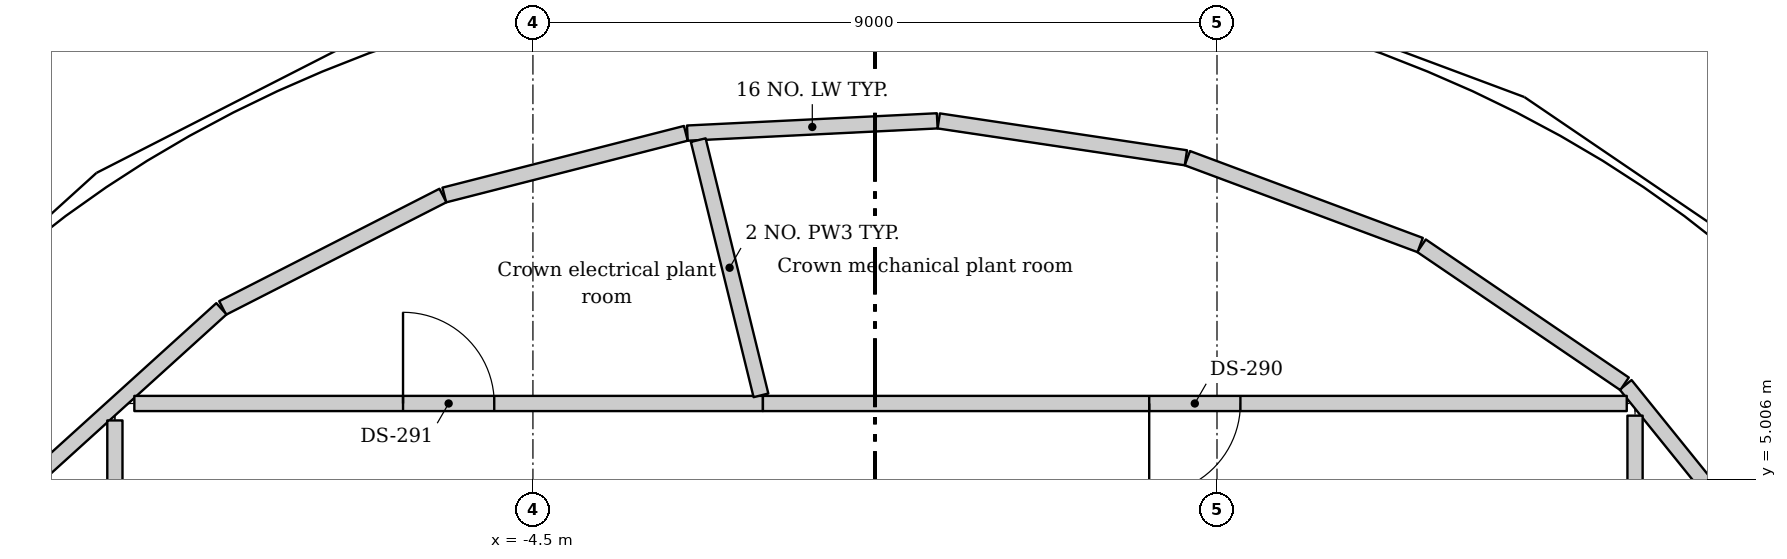
"""IFC4 building model, lengths in metres.
Left out: names, types, materials, properties, quantities, classifications, styles, units other than length and angle.
Written with IfcOpenShell. Run it as: python <this file> out.ifc"""

import sys

from ifc_helpers import new_model, si_unit, direction, frame, frame_2d, origin, place, context, subcontext, project, spatial, rectangle, extrude, source, transform, mapped, element, fill, save


model = new_model("IFC4")
c1 = context("Model", 3, precision=1e-05, world=origin(), true_north=direction((0.0, 1.0)))
c2 = subcontext(c1, "Body", "Model", "MODEL_VIEW")
j1 = project(units=[si_unit("LENGTHUNIT", "METRE"), si_unit("PLANEANGLEUNIT", "RADIAN")], contexts=[c1])
p1 = place(None, origin())
s1 = spatial("IfcSite", under=j1, at=p1, CompositionType="ELEMENT")
p2 = place(p1, origin())
s2 = spatial("IfcBuilding", under=s1, at=p2, CompositionType="ELEMENT")
p3 = place(p2, frame((0.0, 0.0, 365.5)))
s3 = spatial("IfcBuildingStorey", under=s2, at=p3, CompositionType="ELEMENT", Elevation=365.5)
m1 = source(origin(), c2, "Body", "SweptSolid", [
    extrude(rectangle(XDim=3.175, YDim=0.2, at=frame_2d((1.587, 0.0))), origin(), (0.0, 0.0, 1.0), 4.25),
])
p4 = place(p3, frame((9.876, 6.246, 0.0), z_axis=(0.0, 0.0, 1.0), x_axis=(0.628308465475, -0.777964312943, 0.0)))
e1 = element("IfcWall", 1, at=p4, inside=s3, PredefinedType="SOLIDWALL", context=c2, shape_type="MappedRepresentation", body=[
    mapped(m1, transform((0.0, 0.0, 0.0))),
])
m2 = source(origin(), c2, "Body", "SweptSolid", [
    extrude(rectangle(XDim=3.23, YDim=0.2, at=frame_2d((1.615, 0.0))), origin(), (0.0, 0.0, 1.0), 4.25),
])
p5 = place(p3, frame((7.191, 8.076, 0.0), z_axis=(0.0, 0.0, 1.0), x_axis=(0.826887140507, -0.562367901701, 0.0)))
e2 = element("IfcWall", 2, at=p5, inside=s3, PredefinedType="SOLIDWALL", context=c2, shape_type="MappedRepresentation", body=[
    mapped(m2, transform((0.0, 0.0, 0.0))),
])
m3 = source(origin(), c2, "Body", "SweptSolid", [
    extrude(rectangle(XDim=3.269, YDim=0.2, at=frame_2d((1.635, 0.0))), origin(), (0.0, 0.0, 1.0), 4.25),
])
p6 = place(p3, frame((4.11, 9.228, 0.0), z_axis=(0.0, 0.0, 1.0), x_axis=(0.936886529357, -0.34963356691, 0.0)))
e3 = element("IfcWall", 3, at=p6, inside=s3, PredefinedType="SOLIDWALL", context=c2, shape_type="MappedRepresentation", body=[
    mapped(m3, transform((0.0, 0.0, 0.0))),
])
m4 = source(origin(), c2, "Body", "SweptSolid", [
    extrude(rectangle(XDim=3.288, YDim=0.2, at=frame_2d((1.644, 0.0))), origin(), (0.0, 0.0, 1.0), 4.25),
])
p7 = place(p3, frame((0.839, 9.718, 0.0), z_axis=(0.0, 0.0, 1.0), x_axis=(0.989054235862, -0.147552426358, 0.0)))
e4 = element("IfcWall", 4, at=p7, inside=s3, PredefinedType="SOLIDWALL", context=c2, shape_type="MappedRepresentation", body=[
    mapped(m4, transform((0.0, 0.0, 0.0))),
])
m5 = source(origin(), c2, "Body", "SweptSolid", [
    extrude(rectangle(XDim=3.292, YDim=0.2, at=frame_2d((1.646, 0.0))), origin(), (0.0, 0.0, 1.0), 4.25),
])
p8 = place(p3, frame((-2.468, 9.558, 0.0), z_axis=(0.0, 0.0, 1.0), x_axis=(0.998797426177, 0.049027558199, 0.0)))
e5 = element("IfcWall", 5, at=p8, inside=s3, PredefinedType="SOLIDWALL", context=c2, shape_type="MappedRepresentation", body=[
    mapped(m5, transform((0.0, 0.0, 0.0))),
])
m6 = source(origin(), c2, "Body", "SweptSolid", [
    extrude(rectangle(XDim=3.28, YDim=0.2, at=frame_2d((1.64, 0.0))), origin(), (0.0, 0.0, 1.0), 4.25),
])
p9 = place(p3, frame((-5.666, 8.743, 0.0), z_axis=(0.0, 0.0, 1.0), x_axis=(0.968908599462, 0.247418927911, 0.0)))
e6 = element("IfcWall", 6, at=p9, inside=s3, PredefinedType="SOLIDWALL", context=c2, shape_type="MappedRepresentation", body=[
    mapped(m6, transform((0.0, 0.0, 0.0))),
])
m7 = source(origin(), c2, "Body", "SweptSolid", [
    extrude(rectangle(XDim=3.253, YDim=0.2, at=frame_2d((1.627, 0.0))), origin(), (0.0, 0.0, 1.0), 4.25),
])
p10 = place(p3, frame((-8.582, 7.257, 0.0), z_axis=(0.0, 0.0, 1.0), x_axis=(0.89068931978, 0.45461251152, 0.0)))
e7 = element("IfcWall", 7, at=p10, inside=s3, PredefinedType="SOLIDWALL", context=c2, shape_type="MappedRepresentation", body=[
    mapped(m7, transform((0.0, 0.0, 0.0))),
])
m8 = source(origin(), c2, "Body", "SweptSolid", [
    extrude(rectangle(XDim=3.205, YDim=0.2, at=frame_2d((1.603, 0.0))), origin(), (0.0, 0.0, 1.0), 4.25),
])
p11 = place(p3, frame((-10.974, 5.094, 0.0), z_axis=(0.0, 0.0, 1.0), x_axis=(0.741131432131, 0.671359963289, 0.0)))
e8 = element("IfcWall", 8, at=p11, inside=s3, PredefinedType="SOLIDWALL", context=c2, shape_type="MappedRepresentation", body=[
    mapped(m8, transform((0.0, 0.0, 0.0))),
])
m9 = source(origin(), c2, "Body", "SweptSolid", [
    extrude(rectangle(XDim=7.759, YDim=0.2, at=frame_2d((3.879, 0.0))), origin(), (0.0, 0.0, 1.0), 4.25),
])
p12 = place(p3, frame((-10.0, -1.982, 0.0), z_axis=(0.0, 0.0, 1.0), x_axis=(0.0, 1.0, 0.0)))
e9 = element("IfcWall", 9, at=p12, inside=s3, PredefinedType="PARTITIONING", context=c2, shape_type="MappedRepresentation", body=[
    mapped(m9, transform((0.0, 0.0, 0.0))),
])
m10 = source(origin(), c2, "Body", "SweptSolid", [
    extrude(rectangle(XDim=1.2, YDim=2.1, at=frame_2d((0.6, 1.05))), frame((0.0, 0.11, 0.0), z_axis=(0.0, -1.0, 0.0), x_axis=(1.0, 0.0, 0.0)), (0.0, 0.0, 1.0), 0.22),
])
p13 = place(p12, frame((3.28, 0.0, 0.0)))
e10 = element("IfcOpeningElement", 10, at=p13, cuts=e9, PredefinedType="OPENING", context=c2, shape_type="MappedRepresentation", body=[
    mapped(m10, transform((0.0, 0.0, 0.0))),
])
m11 = source(origin(), c2, "Body", "SweptSolid", [
    extrude(rectangle(XDim=8.27, YDim=0.2, at=frame_2d((4.135, 0.0))), origin(), (0.0, 0.0, 1.0), 4.25),
])
p14 = place(p3, frame((-9.744, 6.0, 0.0), z_axis=(0.0, 0.0, 1.0), x_axis=(1.0, 0.0, 0.0)))
e11 = element("IfcWall", 11, at=p14, inside=s3, PredefinedType="PARTITIONING", context=c2, shape_type="MappedRepresentation", body=[
    mapped(m11, transform((0.0, 0.0, 0.0))),
])
p15 = place(p14, frame((3.535, 0.0, 0.0)))
e12 = element("IfcOpeningElement", 12, at=p15, cuts=e11, PredefinedType="OPENING", context=c2, shape_type="MappedRepresentation", body=[
    mapped(m10, transform((0.0, 0.0, 0.0))),
])
m12 = source(origin(), c2, "Body", "SweptSolid", [
    extrude(rectangle(XDim=3.458, YDim=0.2, at=frame_2d((1.729, 0.0))), origin(), (0.0, 0.0, 1.0), 4.25),
])
p16 = place(p3, frame((-1.5, 6.107, 0.0), z_axis=(0.0, 0.0, 1.0), x_axis=(-0.238563284271, 0.971126953286, 0.0)))
e13 = element("IfcWall", 13, at=p16, inside=s3, PredefinedType="PARTITIONING", context=c2, shape_type="MappedRepresentation", body=[
    mapped(m12, transform((0.0, 0.0, 0.0))),
])
m13 = source(origin(), c2, "Body", "SweptSolid", [
    extrude(rectangle(XDim=11.365, YDim=0.2, at=frame_2d((5.683, 0.0))), origin(), (0.0, 0.0, 1.0), 4.25),
])
p17 = place(p3, frame((-1.474, 6.0, 0.0), z_axis=(0.0, 0.0, 1.0), x_axis=(1.0, 0.0, 0.0)))
e14 = element("IfcWall", 14, at=p17, inside=s3, PredefinedType="PARTITIONING", context=c2, shape_type="MappedRepresentation", body=[
    mapped(m13, transform((0.0, 0.0, 0.0))),
])
p18 = place(p17, frame((5.082, 0.0, 0.0)))
e15 = element("IfcOpeningElement", 15, at=p18, cuts=e14, PredefinedType="OPENING", context=c2, shape_type="MappedRepresentation", body=[
    mapped(m10, transform((0.0, 0.0, 0.0))),
])
m14 = source(origin(), c2, "Body", "SweptSolid", [
    extrude(rectangle(XDim=3.858, YDim=0.2, at=frame_2d((1.929, 0.0))), origin(), (0.0, 0.0, 1.0), 4.25),
])
p19 = place(p3, frame((10.0, 5.84, 0.0), z_axis=(0.0, 0.0, 1.0), x_axis=(0.0, -1.0, 0.0)))
e16 = element("IfcWall", 16, at=p19, inside=s3, PredefinedType="PARTITIONING", context=c2, shape_type="MappedRepresentation", body=[
    mapped(m14, transform((0.0, 0.0, 0.0))),
])
p20 = place(p19, frame((1.329, 0.0, 0.0)))
e17 = element("IfcOpeningElement", 17, at=p20, cuts=e16, PredefinedType="OPENING", context=c2, shape_type="MappedRepresentation", body=[
    mapped(m10, transform((0.0, 0.0, 0.0))),
])
m15 = source(origin(), c2, "Body", "SweptSolid", [
    extrude(rectangle(XDim=1.2, YDim=2.1, at=frame_2d((0.6, 1.05))), frame((0.0, 0.025, 0.0), z_axis=(0.0, -1.0, 0.0), x_axis=(1.0, 0.0, 0.0)), (0.0, 0.0, 1.0), 0.05),
])
p21 = place(p18, origin())
e18 = element("IfcDoor", 18, at=p21, inside=s3, OperationType="SINGLE_SWING_LEFT", PredefinedType="DOOR", context=c2, shape_type="MappedRepresentation", body=[
    mapped(m15, transform((0.0, 0.0, 0.0))),
])
fill(e15, e18)
p22 = place(p15, origin())
e19 = element("IfcDoor", 19, at=p22, inside=s3, OperationType="SINGLE_SWING_LEFT", PredefinedType="DOOR", context=c2, shape_type="MappedRepresentation", body=[
    mapped(m15, transform((0.0, 0.0, 0.0))),
])
fill(e12, e19)
save(model, sys.argv[1])
